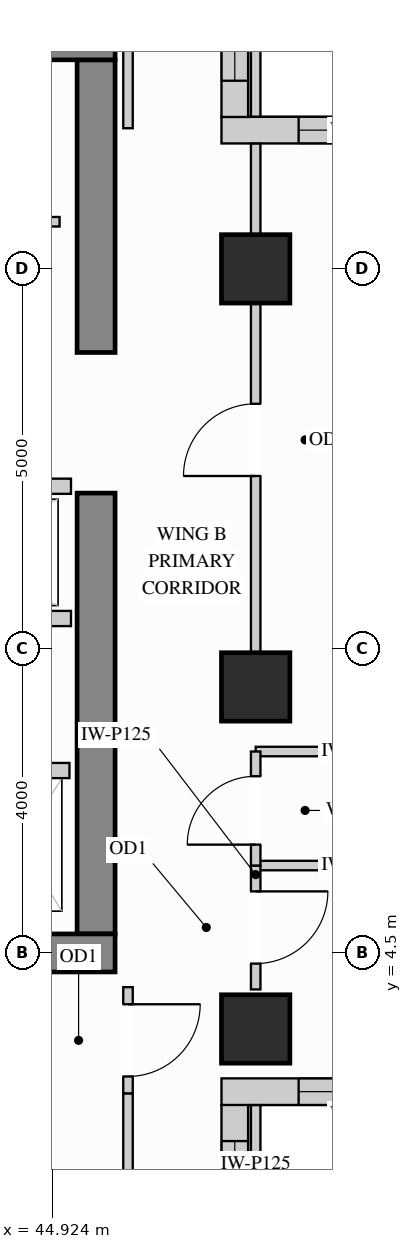
"""IFC4 building model, lengths in metres.
Left out: names, types, materials, properties, quantities, classifications, styles, units other than length and angle.
Written with IfcOpenShell. Run it as: python <this file> out.ifc"""

import sys

from ifc_helpers import new_model, si_unit, direction, frame, frame_2d, origin, origin_2d, place, context, subcontext, project, spatial, rectangle, extrude, source, transform, mapped, element, fill, save


model = new_model("IFC4")
c1 = context("Model", 3, precision=1e-05, world=origin(), true_north=direction((0.0, 1.0)))
c2 = subcontext(c1, "Body", "Model", "MODEL_VIEW")
j1 = project(units=[si_unit("LENGTHUNIT", "METRE"), si_unit("PLANEANGLEUNIT", "RADIAN")], contexts=[c1])
p1 = place(None, origin())
s1 = spatial("IfcSite", under=j1, at=p1, CompositionType="ELEMENT")
p2 = place(p1, origin())
s2 = spatial("IfcBuilding", under=s1, at=p2, CompositionType="ELEMENT")
p3 = place(p2, frame((0.0, 0.0, 234.0)))
s3 = spatial("IfcBuildingStorey", under=s2, at=p3, CompositionType="ELEMENT", Elevation=234.0)
m1 = source(origin(), c2, "Body", "SweptSolid", [
    extrude(rectangle(XDim=0.9, YDim=0.9, at=origin_2d()), origin(), (0.0, 0.0, 1.0), 3.4),
])
for number, where, z_axis, x_axis in (
    (1, (47.6, 13.5, 0.0), (0.0, 0.0, 1.0), (1.0, 0.0, 0.0)),
    (2, (47.6, 3.5, 0.0), (0.0, 0.0, 1.0), (1.0, 0.0, 0.0)),
    (3, (47.6, 8.0, 0.0), (0.0, 0.0, 1.0), (1.0, 0.0, 0.0)),
):
    element("IfcColumn", number, at=place(p3, frame(where, z_axis=z_axis, x_axis=x_axis)), inside=s3, PredefinedType="COLUMN", context=c2, shape_type="MappedRepresentation", body=[
        mapped(m1, transform((0.0, 0.0, 0.0), x_axis=(1.0, 0.0, 0.0), y_axis=(0.0, 1.0, 0.0), z_axis=(0.0, 0.0, 1.0))),
    ])
m2 = source(origin(), c2, "Body", "SweptSolid", [
    extrude(rectangle(XDim=5.8, YDim=0.5, at=frame_2d((2.9, 0.0))), origin(), (0.0, 0.0, 1.0), 3.4),
])
p4 = place(p3, frame((45.5, 4.75, 0.0), z_axis=(0.0, 0.0, 1.0), x_axis=(0.0, 1.0, 0.0)))
e4 = element("IfcWall", 4, at=p4, inside=s3, PredefinedType="SHEAR", context=c2, shape_type="MappedRepresentation", body=[
    mapped(m2, transform((0.0, 0.0, 0.0), x_axis=(1.0, 0.0, 0.0), y_axis=(0.0, 1.0, 0.0), z_axis=(0.0, 0.0, 1.0))),
])
m3 = source(origin(), c2, "Body", "SweptSolid", [
    extrude(rectangle(XDim=3.85, YDim=0.5, at=frame_2d((1.925, 0.0))), origin(), (0.0, 0.0, 1.0), 3.4),
])
p5 = place(p3, frame((45.5, 12.4, 0.0), z_axis=(0.0, 0.0, 1.0), x_axis=(0.0, 1.0, 0.0)))
e5 = element("IfcWall", 5, at=p5, inside=s3, PredefinedType="SHEAR", context=c2, shape_type="MappedRepresentation", body=[
    mapped(m3, transform((0.0, 0.0, 0.0), x_axis=(1.0, 0.0, 0.0), y_axis=(0.0, 1.0, 0.0), z_axis=(0.0, 0.0, 1.0))),
])
m4 = source(origin(), c2, "Body", "SweptSolid", [
    extrude(rectangle(XDim=10.0, YDim=0.5, at=frame_2d((5.0, 0.0))), origin(), (0.0, 0.0, 1.0), 3.4),
])
for number, where, z_axis, x_axis in (
    (6, (35.75, 16.5, 0.0), (0.0, 0.0, 1.0), (1.0, 0.0, 0.0)),
    (7, (35.75, 4.5, 0.0), (0.0, 0.0, 1.0), (1.0, 0.0, 0.0)),
):
    element("IfcWall", number, at=place(p3, frame(where, z_axis=z_axis, x_axis=x_axis)), inside=s3, PredefinedType="SHEAR", context=c2, shape_type="MappedRepresentation", body=[
        mapped(m4, transform((0.0, 0.0, 0.0), x_axis=(1.0, 0.0, 0.0), y_axis=(0.0, 1.0, 0.0), z_axis=(0.0, 0.0, 1.0))),
    ])
p6 = place(p3, frame((47.325, 0.348, 0.0), z_axis=(0.0, 0.0, 1.0), x_axis=(0.0, 1.0, 0.0)))
e8 = element("IfcWall", 8, at=p6, inside=s3, PredefinedType="SOLIDWALL", context=c2, shape_type="SweptSolid", body=[
    extrude(rectangle(XDim=2.154, YDim=0.35, at=frame_2d((1.077, 0.0))), origin(), (0.0, 0.0, 1.0), 3.385),
])
p7 = place(p6, frame((0.477, 0.0, 0.78)))
e9 = element("IfcOpeningElement", 9, at=p7, cuts=e8, PredefinedType="OPENING", context=c2, shape_type="SweptSolid", body=[
    extrude(rectangle(XDim=1.2, YDim=2.1, at=frame_2d((0.6, 1.05))), frame((0.0, 0.185, 0.0), z_axis=(0.0, -1.0, 0.0), x_axis=(1.0, 0.0, 0.0)), (0.0, 0.0, 1.0), 0.37),
])
p8 = place(p3, frame((47.15, 2.675, 0.0), z_axis=(0.0, 0.0, 1.0), x_axis=(1.0, 0.0, 0.0)))
e10 = element("IfcWall", 10, at=p8, inside=s3, PredefinedType="SOLIDWALL", context=c2, shape_type="SweptSolid", body=[
    extrude(rectangle(XDim=2.85, YDim=0.35, at=frame_2d((1.425, 0.0))), origin(), (0.0, 0.0, 1.0), 3.385),
])
p9 = place(p8, frame((1.015, 0.0, 0.78)))
e11 = element("IfcOpeningElement", 11, at=p9, cuts=e10, PredefinedType="OPENING", context=c2, shape_type="SweptSolid", body=[
    extrude(rectangle(XDim=1.2, YDim=2.1, at=frame_2d((0.6, 1.05))), frame((0.0, 0.185, 0.0), z_axis=(0.0, -1.0, 0.0), x_axis=(1.0, 0.0, 0.0)), (0.0, 0.0, 1.0), 0.37),
])
p10 = place(p3, frame((50.0, 15.325, 0.0), z_axis=(0.0, 0.0, 1.0), x_axis=(-1.0, 0.0, 0.0)))
e12 = element("IfcWall", 12, at=p10, inside=s3, PredefinedType="SOLIDWALL", context=c2, shape_type="SweptSolid", body=[
    extrude(rectangle(XDim=2.85, YDim=0.35, at=frame_2d((1.425, 0.0))), origin(), (0.0, 0.0, 1.0), 3.385),
])
p11 = place(p10, frame((0.635, 0.0, 0.78)))
e13 = element("IfcOpeningElement", 13, at=p11, cuts=e12, PredefinedType="OPENING", context=c2, shape_type="SweptSolid", body=[
    extrude(rectangle(XDim=1.2, YDim=2.1, at=frame_2d((0.6, 1.05))), frame((0.0, 0.185, 0.0), z_axis=(0.0, -1.0, 0.0), x_axis=(1.0, 0.0, 0.0)), (0.0, 0.0, 1.0), 0.37),
])
p12 = place(p3, frame((47.325, 15.498, 0.0), z_axis=(0.0, 0.0, 1.0), x_axis=(0.0, 1.0, 0.0)))
e14 = element("IfcWall", 14, at=p12, inside=s3, PredefinedType="SOLIDWALL", context=c2, shape_type="SweptSolid", body=[
    extrude(rectangle(XDim=2.154, YDim=0.35, at=frame_2d((1.077, 0.0))), origin(), (0.0, 0.0, 1.0), 3.385),
])
p13 = place(p12, frame((0.477, 0.0, 0.78)))
e15 = element("IfcOpeningElement", 15, at=p13, cuts=e14, PredefinedType="OPENING", context=c2, shape_type="SweptSolid", body=[
    extrude(rectangle(XDim=1.2, YDim=2.1, at=frame_2d((0.6, 1.05))), frame((0.0, 0.185, 0.0), z_axis=(0.0, -1.0, 0.0), x_axis=(1.0, 0.0, 0.0)), (0.0, 0.0, 1.0), 0.37),
])
p14 = place(p3, frame((36.5, 14.12, 0.0), z_axis=(0.0, 0.0, 1.0), x_axis=(1.0, 0.0, 0.0)))
e16 = element("IfcWall", 16, at=p14, inside=s3, PredefinedType="PARTITIONING", context=c2, shape_type="SweptSolid", body=[
    extrude(rectangle(XDim=8.52, YDim=0.125, at=frame_2d((4.26, 0.0))), origin(), (0.0, 0.0, 1.0), 3.385),
])
p15 = place(p14, frame((3.785, 0.0, 0.0)))
e17 = element("IfcOpeningElement", 17, at=p15, cuts=e16, PredefinedType="OPENING", context=c2, shape_type="SweptSolid", body=[
    extrude(rectangle(XDim=0.95, YDim=2.15, at=frame_2d((0.475, 1.075))), frame((0.0, 0.073, 0.0), z_axis=(0.0, -1.0, 0.0), x_axis=(1.0, 0.0, 0.0)), (0.0, 0.0, 1.0), 0.145),
])
m5 = source(origin(), c2, "Body", "SweptSolid", [
    extrude(rectangle(XDim=2.048, YDim=0.125, at=frame_2d((1.024, 0.0))), origin(), (0.0, 0.0, 1.0), 3.385),
])
for number, where, z_axis, x_axis in (
    (18, (47.6, 5.65, 0.0), (0.0, 0.0, 1.0), (1.0, 0.0, 0.0)),
    (19, (47.6, 7.15, 0.0), (0.0, 0.0, 1.0), (1.0, 0.0, 0.0)),
):
    element("IfcWall", number, at=place(p3, frame(where, z_axis=z_axis, x_axis=x_axis)), inside=s3, PredefinedType="PARTITIONING", context=c2, shape_type="MappedRepresentation", body=[
        mapped(m5, transform((0.0, 0.0, 0.0), x_axis=(1.0, 0.0, 0.0), y_axis=(0.0, 1.0, 0.0), z_axis=(0.0, 0.0, 1.0))),
    ])
p16 = place(p3, frame((47.6, 4.02, 0.0), z_axis=(0.0, 0.0, 1.0), x_axis=(0.0, 1.0, 0.0)))
e20 = element("IfcWall", 20, at=p16, inside=s3, PredefinedType="PARTITIONING", context=c2, shape_type="SweptSolid", body=[
    extrude(rectangle(XDim=1.63, YDim=0.125, at=frame_2d((0.815, 0.0))), origin(), (0.0, 0.0, 1.0), 2.773),
])
p17 = place(p16, frame((0.34, 0.0, 0.0)))
e21 = element("IfcOpeningElement", 21, at=p17, cuts=e20, PredefinedType="OPENING", context=c2, shape_type="SweptSolid", body=[
    extrude(rectangle(XDim=0.95, YDim=2.15, at=frame_2d((0.475, 1.075))), frame((0.0, 0.073, 0.0), z_axis=(0.0, -1.0, 0.0), x_axis=(1.0, 0.0, 0.0)), (0.0, 0.0, 1.0), 0.145),
])
m6 = source(origin(), c2, "Body", "SweptSolid", [
    extrude(rectangle(XDim=2.148, YDim=0.125, at=frame_2d((1.074, 0.0))), origin(), (0.0, 0.0, 1.0), 3.385),
])
p18 = place(p3, frame((47.6, 0.35, 0.0), z_axis=(0.0, 0.0, 1.0), x_axis=(0.0, 1.0, 0.0)))
e22 = element("IfcWall", 22, at=p18, inside=s3, PredefinedType="PARTITIONING", context=c2, shape_type="MappedRepresentation", body=[
    mapped(m6, transform((0.0, 0.0, 0.0), x_axis=(1.0, 0.0, 0.0), y_axis=(0.0, 1.0, 0.0), z_axis=(0.0, 0.0, 1.0))),
])
p19 = place(p3, frame((47.6, 8.45, 0.0), z_axis=(0.0, 0.0, 1.0), x_axis=(0.0, 1.0, 0.0)))
e23 = element("IfcWall", 23, at=p19, inside=s3, PredefinedType="PARTITIONING", context=c2, shape_type="SweptSolid", body=[
    extrude(rectangle(XDim=4.6, YDim=0.125, at=frame_2d((2.3, 0.0))), origin(), (0.0, 0.0, 1.0), 2.773),
])
p20 = place(p19, frame((2.325, 0.0, 0.0)))
e24 = element("IfcOpeningElement", 24, at=p20, cuts=e23, PredefinedType="OPENING", context=c2, shape_type="SweptSolid", body=[
    extrude(rectangle(XDim=0.95, YDim=2.15, at=frame_2d((0.475, 1.075))), frame((0.0, 0.073, 0.0), z_axis=(0.0, -1.0, 0.0), x_axis=(1.0, 0.0, 0.0)), (0.0, 0.0, 1.0), 0.145),
])
m7 = source(origin(), c2, "Body", "SweptSolid", [
    extrude(rectangle(XDim=1.198, YDim=0.125, at=frame_2d((0.599, 0.0))), origin(), (0.0, 0.0, 1.0), 3.385),
])
p21 = place(p3, frame((47.6, 13.95, 0.0), z_axis=(0.0, 0.0, 1.0), x_axis=(0.0, 1.0, 0.0)))
e25 = element("IfcWall", 25, at=p21, inside=s3, PredefinedType="PARTITIONING", context=c2, shape_type="MappedRepresentation", body=[
    mapped(m7, transform((0.0, 0.0, 0.0), x_axis=(1.0, 0.0, 0.0), y_axis=(0.0, 1.0, 0.0), z_axis=(0.0, 0.0, 1.0))),
])
p22 = place(p3, frame((47.6, 15.502, 0.0), z_axis=(0.0, 0.0, 1.0), x_axis=(0.0, 1.0, 0.0)))
e26 = element("IfcWall", 26, at=p22, inside=s3, PredefinedType="PARTITIONING", context=c2, shape_type="MappedRepresentation", body=[
    mapped(m6, transform((0.0, 0.0, 0.0), x_axis=(1.0, 0.0, 0.0), y_axis=(0.0, 1.0, 0.0), z_axis=(0.0, 0.0, 1.0))),
])
p23 = place(p3, frame((47.6, 5.65, 0.0), z_axis=(0.0, 0.0, 1.0), x_axis=(0.0, 1.0, 0.0)))
e27 = element("IfcWall", 27, at=p23, inside=s3, PredefinedType="PARTITIONING", context=c2, shape_type="SweptSolid", body=[
    extrude(rectangle(XDim=1.5, YDim=0.125, at=frame_2d((0.75, 0.0))), origin(), (0.0, 0.0, 1.0), 2.773),
])
p24 = place(p23, frame((0.275, 0.0, 0.0)))
e28 = element("IfcOpeningElement", 28, at=p24, cuts=e27, PredefinedType="OPENING", context=c2, shape_type="SweptSolid", body=[
    extrude(rectangle(XDim=0.9, YDim=2.15, at=frame_2d((0.45, 1.075))), frame((0.0, 0.073, 0.0), z_axis=(0.0, -1.0, 0.0), x_axis=(1.0, 0.0, 0.0)), (0.0, 0.0, 1.0), 0.145),
])
m8 = source(origin(), c2, "Body", "SweptSolid", [
    extrude(rectangle(XDim=2.298, YDim=0.125, at=frame_2d((1.149, 0.0))), origin(), (0.0, 0.0, 1.0), 3.385),
])
p25 = place(p3, frame((45.92, 15.35, 0.0), z_axis=(0.0, 0.0, 1.0), x_axis=(0.0, 1.0, 0.0)))
e29 = element("IfcWall", 29, at=p25, inside=s3, PredefinedType="PARTITIONING", context=c2, shape_type="MappedRepresentation", body=[
    mapped(m8, transform((0.0, 0.0, 0.0), x_axis=(1.0, 0.0, 0.0), y_axis=(0.0, 1.0, 0.0), z_axis=(0.0, 0.0, 1.0))),
])
p26 = place(p3, frame((45.92, 2.65, 0.0), z_axis=(0.0, 0.0, 1.0), x_axis=(0.0, 1.0, 0.0)))
e30 = element("IfcWall", 30, at=p26, inside=s3, PredefinedType="PARTITIONING", context=c2, shape_type="SweptSolid", body=[
    extrude(rectangle(XDim=1.4, YDim=0.125, at=frame_2d((0.7, 0.0))), origin(), (0.0, 0.0, 1.0), 3.385),
])
p27 = place(p26, frame((0.225, 0.0, 0.0)))
e31 = element("IfcOpeningElement", 31, at=p27, cuts=e30, PredefinedType="OPENING", context=c2, shape_type="SweptSolid", body=[
    extrude(rectangle(XDim=0.95, YDim=2.15, at=frame_2d((0.475, 1.075))), frame((0.0, 0.073, 0.0), z_axis=(0.0, -1.0, 0.0), x_axis=(1.0, 0.0, 0.0)), (0.0, 0.0, 1.0), 0.145),
])
p28 = place(p3, frame((45.92, 0.352, 0.0), z_axis=(0.0, 0.0, 1.0), x_axis=(0.0, 1.0, 0.0)))
e32 = element("IfcWall", 32, at=p28, inside=s3, PredefinedType="PARTITIONING", context=c2, shape_type="MappedRepresentation", body=[
    mapped(m8, transform((0.0, 0.0, 0.0), x_axis=(1.0, 0.0, 0.0), y_axis=(0.0, 1.0, 0.0), z_axis=(0.0, 0.0, 1.0))),
])
m9 = source(origin(), c2, "Body", "SweptSolid", [
    extrude(rectangle(XDim=1.3, YDim=0.2, at=frame_2d((0.65, 0.0))), origin(), (0.0, 0.0, 1.0), 3.385),
])
p29 = place(p3, frame((43.85, 6.9, 0.0), z_axis=(0.0, 0.0, 1.0), x_axis=(1.0, 0.0, 0.0)))
e33 = element("IfcWall", 33, at=p29, inside=s3, PredefinedType="PARTITIONING", context=c2, shape_type="MappedRepresentation", body=[
    mapped(m9, transform((0.0, 0.0, 0.0), x_axis=(1.0, 0.0, 0.0), y_axis=(0.0, 1.0, 0.0), z_axis=(0.0, 0.0, 1.0))),
])
m10 = source(origin(), c2, "Body", "SweptSolid", [
    extrude(rectangle(XDim=3.49, YDim=0.2, at=frame_2d((1.745, 0.0))), origin(), (0.0, 0.0, 1.0), 3.385),
])
for number, where, z_axis, x_axis in (
    (34, (41.68, 10.64, 0.0), (0.0, 0.0, 1.0), (1.0, 0.0, 0.0)),
    (35, (41.68, 8.9, 0.0), (0.0, 0.0, 1.0), (1.0, 0.0, 0.0)),
):
    element("IfcWall", number, at=place(p3, frame(where, z_axis=z_axis, x_axis=x_axis)), inside=s3, PredefinedType="PARTITIONING", context=c2, shape_type="MappedRepresentation", body=[
        mapped(m10, transform((0.0, 0.0, 0.0), x_axis=(1.0, 0.0, 0.0), y_axis=(0.0, 1.0, 0.0), z_axis=(0.0, 0.0, 1.0))),
    ])
m11 = source(origin(), c2, "Body", "SweptSolid", [
    extrude(rectangle(XDim=0.95, YDim=2.15, at=frame_2d((0.475, 1.075))), frame((0.0, 0.025, 0.0), z_axis=(0.0, -1.0, 0.0), x_axis=(1.0, 0.0, 0.0)), (0.0, 0.0, 1.0), 0.05),
])
p30 = place(p27, origin())
e36 = element("IfcDoor", 36, at=p30, inside=s3, OperationType="SINGLE_SWING_RIGHT", PredefinedType="DOOR", context=c2, shape_type="MappedRepresentation", body=[
    mapped(m11, transform((0.0, 0.0, 0.0), x_axis=(1.0, 0.0, 0.0), y_axis=(0.0, 1.0, 0.0), z_axis=(0.0, 0.0, 1.0))),
])
fill(e31, e36)
p31 = place(p17, origin())
e37 = element("IfcDoor", 37, at=p31, inside=s3, OperationType="SINGLE_SWING_RIGHT", PredefinedType="DOOR", context=c2, shape_type="MappedRepresentation", body=[
    mapped(m11, transform((0.0, 0.0, 0.0), x_axis=(1.0, 0.0, 0.0), y_axis=(0.0, 1.0, 0.0), z_axis=(0.0, 0.0, 1.0))),
])
fill(e21, e37)
p32 = place(p20, origin())
e38 = element("IfcDoor", 38, at=p32, inside=s3, OperationType="SINGLE_SWING_LEFT", PredefinedType="DOOR", context=c2, shape_type="MappedRepresentation", body=[
    mapped(m11, transform((0.0, 0.0, 0.0), x_axis=(1.0, 0.0, 0.0), y_axis=(0.0, 1.0, 0.0), z_axis=(0.0, 0.0, 1.0))),
])
fill(e24, e38)
m12 = source(origin(), c2, "Body", "SweptSolid", [
    extrude(rectangle(XDim=0.9, YDim=2.15, at=frame_2d((0.45, 1.075))), frame((0.0, 0.025, 0.0), z_axis=(0.0, -1.0, 0.0), x_axis=(1.0, 0.0, 0.0)), (0.0, 0.0, 1.0), 0.05),
])
p33 = place(p24, origin())
e39 = element("IfcDoor", 39, at=p33, inside=s3, OperationType="SINGLE_SWING_LEFT", PredefinedType="DOOR", context=c2, shape_type="MappedRepresentation", body=[
    mapped(m12, transform((0.0, 0.0, 0.0), x_axis=(1.0, 0.0, 0.0), y_axis=(0.0, 1.0, 0.0), z_axis=(0.0, 0.0, 1.0))),
])
fill(e28, e39)
m13 = source(origin(), c2, "Body", "SweptSolid", [
    extrude(rectangle(XDim=1.2, YDim=2.1, at=frame_2d((0.6, 1.05))), frame((0.0, 0.03, 0.0), z_axis=(0.0, -1.0, 0.0), x_axis=(1.0, 0.0, 0.0)), (0.0, 0.0, 1.0), 0.06),
])
p34 = place(p7, origin())
e40 = element("IfcWindow", 40, at=p34, inside=s3, PartitioningType="SINGLE_PANEL", PredefinedType="WINDOW", context=c2, shape_type="MappedRepresentation", body=[
    mapped(m13, transform((0.0, 0.0, 0.0), x_axis=(1.0, 0.0, 0.0), y_axis=(0.0, 1.0, 0.0), z_axis=(0.0, 0.0, 1.0))),
])
fill(e9, e40)
p35 = place(p9, origin())
e41 = element("IfcWindow", 41, at=p35, inside=s3, PartitioningType="SINGLE_PANEL", PredefinedType="WINDOW", context=c2, shape_type="MappedRepresentation", body=[
    mapped(m13, transform((0.0, 0.0, 0.0), x_axis=(1.0, 0.0, 0.0), y_axis=(0.0, 1.0, 0.0), z_axis=(0.0, 0.0, 1.0))),
])
fill(e11, e41)
p36 = place(p11, origin())
e42 = element("IfcWindow", 42, at=p36, inside=s3, PartitioningType="SINGLE_PANEL", PredefinedType="WINDOW", context=c2, shape_type="MappedRepresentation", body=[
    mapped(m13, transform((0.0, 0.0, 0.0), x_axis=(1.0, 0.0, 0.0), y_axis=(0.0, 1.0, 0.0), z_axis=(0.0, 0.0, 1.0))),
])
fill(e13, e42)
p37 = place(p13, origin())
e43 = element("IfcWindow", 43, at=p37, inside=s3, PartitioningType="SINGLE_PANEL", PredefinedType="WINDOW", context=c2, shape_type="MappedRepresentation", body=[
    mapped(m13, transform((0.0, 0.0, 0.0), x_axis=(1.0, 0.0, 0.0), y_axis=(0.0, 1.0, 0.0), z_axis=(0.0, 0.0, 1.0))),
])
fill(e15, e43)
save(model, sys.argv[1])
